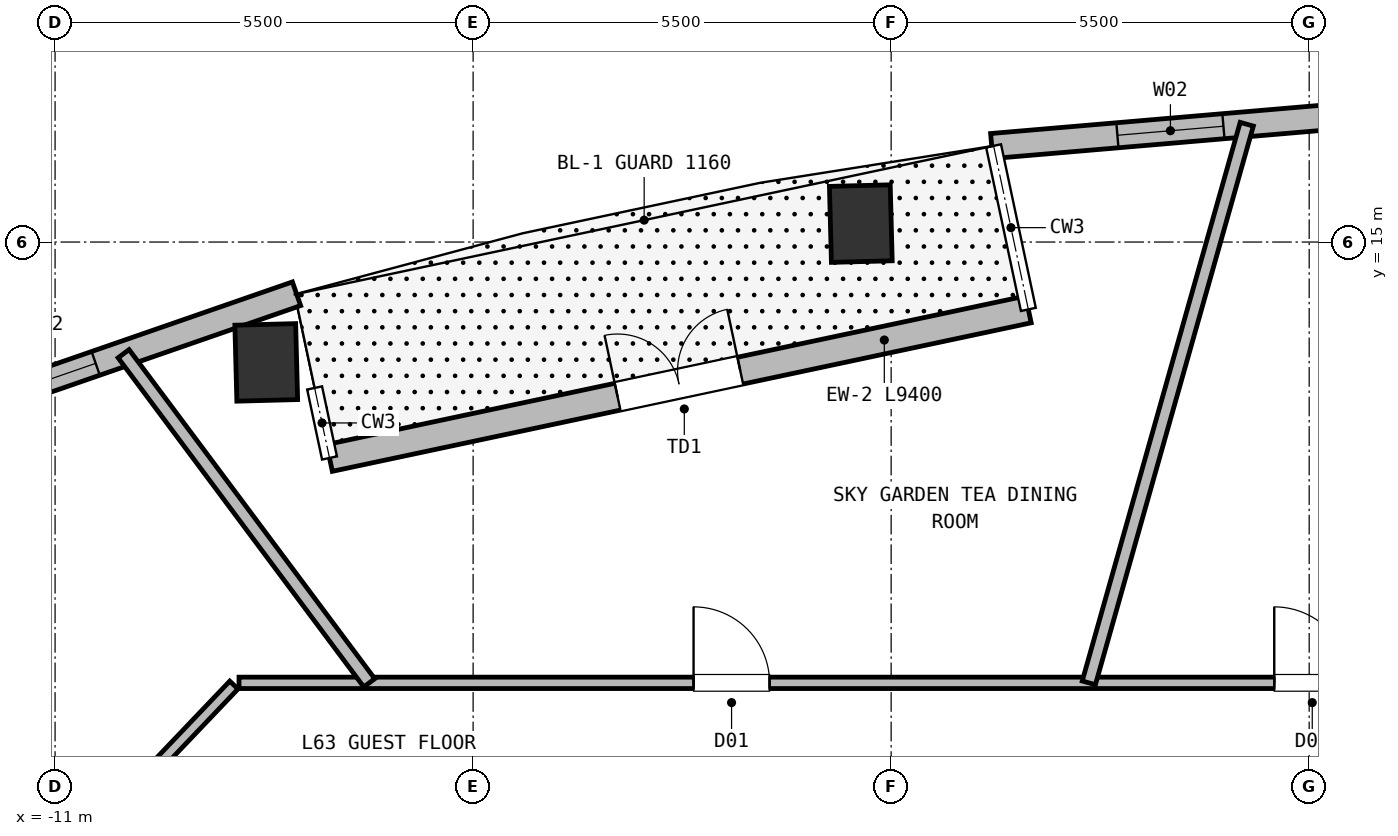
"""IFC4 building model, lengths in metres.
Left out: names, types, materials, properties, quantities, classifications, styles, units other than length and angle.
Written with IfcOpenShell. Run it as: python <this file> out.ifc"""

import sys

from ifc_helpers import new_model, si_unit, direction, frame, frame_2d, origin, origin_2d, place, context, subcontext, project, spatial, rectangle, extrude, element, fill, save


model = new_model("IFC4")
c1 = context("Model", 3, precision=1e-05, world=origin(), true_north=direction((0.0, 1.0)))
c2 = subcontext(c1, "Body", "Model", "MODEL_VIEW")
j1 = project(units=[si_unit("LENGTHUNIT", "METRE"), si_unit("PLANEANGLEUNIT", "RADIAN")], contexts=[c1])
p1 = place(None, origin())
s1 = spatial("IfcSite", under=j1, at=p1, CompositionType="ELEMENT")
p2 = place(p1, origin())
s2 = spatial("IfcBuilding", under=s1, at=p2, CompositionType="ELEMENT")
p3 = place(p2, frame((0.0, 0.0, 251.15)))
s3 = spatial("IfcBuildingStorey", under=s2, at=p3, CompositionType="ELEMENT", Elevation=251.15)
for number, where, z_axis, x_axis in (
    (1, (-0.399, 15.243, 0.0), (0.0, 0.0, 1.0), (1.0, 0.026, 0.0)),
    (2, (-8.222, 13.417, 0.0), (0.0, 0.0, 1.0), (1.0, 0.026, 0.0)),
):
    element("IfcColumn", number, at=place(p3, frame(where, z_axis=z_axis, x_axis=x_axis)), inside=s3, PredefinedType="COLUMN", context=c2, shape_type="SweptSolid", body=[
        extrude(rectangle(XDim=0.8, YDim=1.0, at=origin_2d()), origin(), (0.0, 0.0, 1.0), 3.8),
    ])
p4 = place(p3, frame((-7.389, 12.159, 0.0), z_axis=(0.0, 0.0, 1.0), x_axis=(0.978148090206, 0.207909388017, 0.0)))
e3 = element("IfcWall", 3, at=p4, inside=s3, PredefinedType="SOLIDWALL", context=c2, shape_type="SweptSolid", body=[
    extrude(rectangle(XDim=9.4, YDim=0.36, at=frame_2d((4.7, 0.0))), origin(), (0.0, 0.0, 1.0), 3.49),
])
p5 = place(p4, frame((3.875, 0.0, 0.0)))
e4 = element("IfcOpeningElement", 4, at=p5, cuts=e3, PredefinedType="OPENING", context=c2, shape_type="SweptSolid", body=[
    extrude(rectangle(XDim=1.65, YDim=2.25, at=frame_2d((0.825, 1.125))), frame((0.0, 0.19, 0.0), z_axis=(0.0, -1.0, 0.0), x_axis=(1.0, 0.0, 0.0)), (0.0, 0.0, 1.0), 0.38),
])
p6 = place(p3, frame((1.323, 16.263, 0.0), z_axis=(0.0, 0.0, 1.0), x_axis=(0.996367604773, 0.085156304276, 0.0)))
e5 = element("IfcWall", 5, at=p6, inside=s3, PredefinedType="SOLIDWALL", context=c2, shape_type="SweptSolid", body=[
    extrude(rectangle(XDim=5.656, YDim=0.33, at=frame_2d((2.828, 0.0))), origin(), (0.0, 0.0, 1.0), 3.49),
])
p7 = place(p6, frame((1.66, 0.0, 0.72)))
e6 = element("IfcOpeningElement", 6, at=p7, cuts=e5, PredefinedType="OPENING", context=c2, shape_type="SweptSolid", body=[
    extrude(rectangle(XDim=1.4, YDim=1.88, at=frame_2d((0.7, 0.94))), frame((0.0, 0.175, 0.0), z_axis=(0.0, -1.0, 0.0), x_axis=(1.0, 0.0, 0.0)), (0.0, 0.0, 1.0), 0.35),
])
p8 = place(p3, frame((-13.168, 12.467, 0.0), z_axis=(0.0, 0.0, 1.0), x_axis=(0.944870563984, 0.327444067462, 0.0)))
e7 = element("IfcWall", 7, at=p8, inside=s3, PredefinedType="SOLIDWALL", context=c2, shape_type="SweptSolid", body=[
    extrude(rectangle(XDim=5.657, YDim=0.33, at=frame_2d((2.828, 0.0))), origin(), (0.0, 0.0, 1.0), 3.49),
])
p9 = place(p8, frame((1.46, 0.0, 0.72)))
e8 = element("IfcOpeningElement", 8, at=p9, cuts=e7, PredefinedType="OPENING", context=c2, shape_type="SweptSolid", body=[
    extrude(rectangle(XDim=1.4, YDim=1.88, at=frame_2d((0.7, 0.94))), frame((0.0, 0.175, 0.0), z_axis=(0.0, -1.0, 0.0), x_axis=(1.0, 0.0, 0.0)), (0.0, 0.0, 1.0), 0.35),
])
p10 = place(p3, frame((-8.58, 9.2, 0.0), z_axis=(0.0, 0.0, 1.0), x_axis=(1.0, 0.0, 0.0)))
e9 = element("IfcWall", 9, at=p10, inside=s3, PredefinedType="PARTITIONING", context=c2, shape_type="SweptSolid", body=[
    extrude(rectangle(XDim=17.16, YDim=0.15, at=frame_2d((8.58, 0.0))), origin(), (0.0, 0.0, 1.0), 3.49),
])
p11 = place(p10, frame((5.98, 0.0, 0.0)))
e10 = element("IfcOpeningElement", 10, at=p11, cuts=e9, PredefinedType="OPENING", context=c2, shape_type="SweptSolid", body=[
    extrude(rectangle(XDim=1.0, YDim=2.15, at=frame_2d((0.5, 1.075))), frame((0.0, 0.085, 0.0), z_axis=(0.0, -1.0, 0.0), x_axis=(1.0, 0.0, 0.0)), (0.0, 0.0, 1.0), 0.17),
])
p12 = place(p10, frame((13.62, 0.0, 0.0)))
e11 = element("IfcOpeningElement", 11, at=p12, cuts=e9, PredefinedType="OPENING", context=c2, shape_type="SweptSolid", body=[
    extrude(rectangle(XDim=1.0, YDim=2.15, at=frame_2d((0.5, 1.075))), frame((0.0, 0.085, 0.0), z_axis=(0.0, -1.0, 0.0), x_axis=(1.0, 0.0, 0.0)), (0.0, 0.0, 1.0), 0.17),
])
p13 = place(p3, frame((-10.422, 7.309, 0.0), z_axis=(0.0, 0.0, 1.0), x_axis=(0.689960858356, 0.723846678473, 0.0)))
e12 = element("IfcWall", 12, at=p13, inside=s3, PredefinedType="PARTITIONING", context=c2, shape_type="SweptSolid", body=[
    extrude(rectangle(XDim=2.572, YDim=0.15, at=frame_2d((1.286, 0.0))), origin(), (0.0, 0.0, 1.0), 3.49),
])
p14 = place(p3, frame((2.601, 9.2, 0.0), z_axis=(0.0, 0.0, 1.0), x_axis=(0.272031000257, 0.962288488396, 0.0)))
e13 = element("IfcWall", 13, at=p14, inside=s3, PredefinedType="PARTITIONING", context=c2, shape_type="SweptSolid", body=[
    extrude(rectangle(XDim=7.638, YDim=0.18, at=frame_2d((3.819, 0.0))), origin(), (0.0, 0.0, 1.0), 3.49),
])
p15 = place(p3, frame((-6.866, 9.2, 0.0), z_axis=(0.0, 0.0, 1.0), x_axis=(-0.598111697764, 0.801412750709, 0.0)))
e14 = element("IfcWall", 14, at=p15, inside=s3, PredefinedType="PARTITIONING", context=c2, shape_type="SweptSolid", body=[
    extrude(rectangle(XDim=5.404, YDim=0.18, at=frame_2d((2.702, 0.0))), origin(), (0.0, 0.0, 1.0), 3.49),
])
p16 = place(p5, origin())
e15 = element("IfcDoor", 15, at=p16, inside=s3, OperationType="DOUBLE_DOOR_SINGLE_SWING", PredefinedType="DOOR", context=c2, shape_type="SweptSolid", body=[
    extrude(rectangle(XDim=1.65, YDim=2.25, at=frame_2d((0.825, 1.125))), frame((0.0, 0.025, 0.0), z_axis=(0.0, -1.0, 0.0), x_axis=(1.0, 0.0, 0.0)), (0.0, 0.0, 1.0), 0.05),
])
fill(e4, e15)
p17 = place(p7, origin())
e16 = element("IfcWindow", 16, at=p17, inside=s3, PartitioningType="SINGLE_PANEL", PredefinedType="WINDOW", context=c2, shape_type="SweptSolid", body=[
    extrude(rectangle(XDim=1.4, YDim=1.88, at=frame_2d((0.7, 0.94))), frame((0.0, 0.03, 0.0), z_axis=(0.0, -1.0, 0.0), x_axis=(1.0, 0.0, 0.0)), (0.0, 0.0, 1.0), 0.06),
])
fill(e6, e16)
p18 = place(p9, origin())
e17 = element("IfcWindow", 17, at=p18, inside=s3, PartitioningType="SINGLE_PANEL", PredefinedType="WINDOW", context=c2, shape_type="SweptSolid", body=[
    extrude(rectangle(XDim=1.4, YDim=1.88, at=frame_2d((0.7, 0.94))), frame((0.0, 0.03, 0.0), z_axis=(0.0, -1.0, 0.0), x_axis=(1.0, 0.0, 0.0)), (0.0, 0.0, 1.0), 0.06),
])
fill(e8, e17)
p19 = place(p11, origin())
e18 = element("IfcDoor", 18, at=p19, inside=s3, OperationType="SINGLE_SWING_LEFT", PredefinedType="DOOR", context=c2, shape_type="SweptSolid", body=[
    extrude(rectangle(XDim=1.0, YDim=2.15, at=frame_2d((0.5, 1.075))), frame((0.0, 0.025, 0.0), z_axis=(0.0, -1.0, 0.0), x_axis=(1.0, 0.0, 0.0)), (0.0, 0.0, 1.0), 0.05),
])
fill(e10, e18)
p20 = place(p12, origin())
e19 = element("IfcDoor", 19, at=p20, inside=s3, OperationType="SINGLE_SWING_LEFT", PredefinedType="DOOR", context=c2, shape_type="SweptSolid", body=[
    extrude(rectangle(XDim=1.0, YDim=2.15, at=frame_2d((0.5, 1.075))), frame((0.0, 0.025, 0.0), z_axis=(0.0, -1.0, 0.0), x_axis=(1.0, 0.0, 0.0)), (0.0, 0.0, 1.0), 0.05),
])
fill(e11, e19)
save(model, sys.argv[1])
